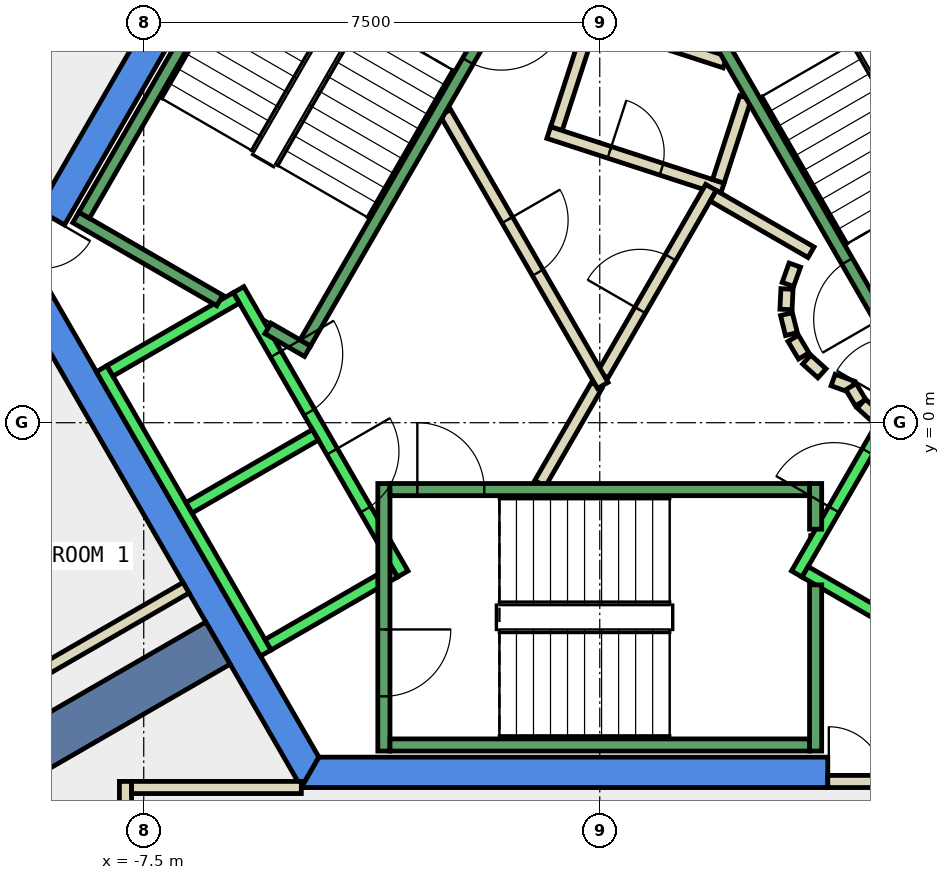
"""IFC4 building model, lengths in metres.
Left out: names, types, materials, properties, quantities, classifications, styles, units other than length and angle.
Written with IfcOpenShell. Run it as: python <this file> out.ifc"""

import sys

from ifc_helpers import new_model, si_unit, direction, frame, frame_2d, origin, place, context, subcontext, project, spatial, polyline, rectangle, outline, extrude, element, fill, save


model = new_model("IFC4")
c1 = context("Model", 3, precision=1e-05, world=origin(), true_north=direction((0.0, 1.0)))
c2 = subcontext(c1, "Body", "Model", "MODEL_VIEW")
j1 = project(units=[si_unit("LENGTHUNIT", "METRE"), si_unit("PLANEANGLEUNIT", "RADIAN")], contexts=[c1])
p1 = place(None, origin())
s1 = spatial("IfcSite", under=j1, at=p1, CompositionType="ELEMENT")
p2 = place(p1, origin())
s2 = spatial("IfcBuilding", under=s1, at=p2, CompositionType="ELEMENT")
p3 = place(p2, frame((0.0, 0.0, 300.8)))
s3 = spatial("IfcBuildingStorey", under=s2, at=p3, CompositionType="ELEMENT", Elevation=300.8)
p4 = place(p3, frame((0.0, 0.0, -0.34)))
e1 = element("IfcWall", 1, at=p4, inside=s3, PredefinedType="SHEAR", context=c2, shape_type="SweptSolid", body=[
    extrude(outline(polyline([(-9.236, 3.502), (-8.803, 3.253), (-4.619, 10.5), (-4.907, 11.0), (-9.236, 3.502)])), origin(), (0.0, 0.0, 1.0), 3.6),
])
p5 = place(p3, frame((0.0, 0.0, -0.34)))
e2 = element("IfcWall", 2, at=p5, inside=s3, PredefinedType="SHEAR", context=c2, shape_type="SweptSolid", body=[
    extrude(outline(polyline([(-9.815, 2.5), (-4.907, -6.0), (-4.619, -5.5), (-9.238, 2.5), (-9.815, 2.5)])), origin(), (0.0, 0.0, 1.0), 3.6),
])
p6 = place(p3, frame((0.0, 0.0, -0.34)))
e3 = element("IfcWall", 3, at=p6, inside=s3, PredefinedType="SHEAR", context=c2, shape_type="SweptSolid", body=[
    extrude(outline(polyline([(3.75, -6.0), (3.75, -5.5), (-4.619, -5.5), (-4.907, -6.0), (3.75, -6.0)])), origin(), (0.0, 0.0, 1.0), 3.6),
])
p7 = place(p3, frame((-6.279, -3.625, -0.34), z_axis=(0.0, 0.0, 1.0), x_axis=(-0.866017533419, -0.500013631625, 0.0)))
e4 = element("IfcWall", 4, at=p7, inside=s3, PredefinedType="SHEAR", context=c2, shape_type="SweptSolid", body=[
    extrude(rectangle(XDim=9.0, YDim=0.8, at=frame_2d((4.5, 0.0))), origin(), (0.0, 0.0, 1.0), 3.6),
])
p8 = place(p3, frame((2.06, 5.931, 0.0), z_axis=(0.0, 0.0, 1.0), x_axis=(-0.95092855133, 0.309410552932, 0.0)))
e5 = element("IfcWall", 5, at=p8, inside=s3, PredefinedType="PARTITIONING", context=c2, shape_type="SweptSolid", body=[
    extrude(rectangle(XDim=2.399, YDim=0.2, at=frame_2d((1.199, 0.0))), origin(), (0.0, 0.0, 1.0), 3.26),
])
p9 = place(p3, frame((-0.157, 6.547, 0.0), z_axis=(0.0, 0.0, 1.0), x_axis=(-0.308813127339, -0.951122732555, 0.0)))
e6 = element("IfcWall", 6, at=p9, inside=s3, PredefinedType="PARTITIONING", context=c2, shape_type="SweptSolid", body=[
    extrude(rectangle(XDim=1.8, YDim=0.2, at=frame_2d((0.9, 0.0))), origin(), (0.0, 0.0, 1.0), 3.26),
])
p10 = place(p3, frame((-0.839, 4.771, 0.0), z_axis=(0.0, 0.0, 1.0), x_axis=(0.950961084355, -0.309310549515, 0.0)))
e7 = element("IfcWall", 7, at=p10, inside=s3, PredefinedType="PARTITIONING", context=c2, shape_type="SweptSolid", body=[
    extrude(rectangle(XDim=3.0, YDim=0.2, at=frame_2d((1.5, 0.0))), origin(), (0.0, 0.0, 1.0), 3.26),
])
p11 = place(p10, frame((1.05, 0.0, 0.0)))
e8 = element("IfcOpeningElement", 8, at=p11, cuts=e7, PredefinedType="OPENING", context=c2, shape_type="SweptSolid", body=[
    extrude(rectangle(XDim=0.9, YDim=2.1, at=frame_2d((0.45, 1.05))), frame((0.0, 0.11, 0.0), z_axis=(0.0, -1.0, 0.0), x_axis=(1.0, 0.0, 0.0)), (0.0, 0.0, 1.0), 0.22),
])
p12 = place(p3, frame((1.95, 3.97, 0.0), z_axis=(0.0, 0.0, 1.0), x_axis=(0.308583003896, 0.951197418892, 0.0)))
e9 = element("IfcWall", 9, at=p12, inside=s3, PredefinedType="PARTITIONING", context=c2, shape_type="SweptSolid", body=[
    extrude(rectangle(XDim=1.449, YDim=0.2, at=frame_2d((0.724, 0.0))), origin(), (0.0, 0.0, 1.0), 3.26),
])
p13 = place(p3, frame((-0.982, -1.0, 0.0), z_axis=(0.0, 0.0, 1.0), x_axis=(0.50024047865, 0.865886518847, 0.0)))
e10 = element("IfcWall", 10, at=p13, inside=s3, PredefinedType="PARTITIONING", context=c2, shape_type="SweptSolid", body=[
    extrude(rectangle(XDim=1.863, YDim=0.2, at=frame_2d((0.931, 0.0))), origin(), (0.0, 0.0, 1.0), 3.26),
])
p14 = place(p3, frame((0.05, 0.787, 0.0), z_axis=(0.0, 0.0, 1.0), x_axis=(0.499954076797, 0.866051915934, 0.0)))
e11 = element("IfcWall", 11, at=p14, inside=s3, PredefinedType="PARTITIONING", context=c2, shape_type="SweptSolid", body=[
    extrude(rectangle(XDim=3.558, YDim=0.2, at=frame_2d((1.779, 0.0))), origin(), (0.0, 0.0, 1.0), 3.26),
])
p15 = place(p14, frame((1.229, 0.0, 0.0)))
e12 = element("IfcOpeningElement", 12, at=p15, cuts=e11, PredefinedType="OPENING", context=c2, shape_type="SweptSolid", body=[
    extrude(rectangle(XDim=1.0, YDim=2.1, at=frame_2d((0.5, 1.05))), frame((0.0, 0.11, 0.0), z_axis=(0.0, -1.0, 0.0), x_axis=(1.0, 0.0, 0.0)), (0.0, 0.0, 1.0), 0.22),
])
p16 = place(p3, frame((1.866, 3.732, 0.0), z_axis=(0.0, 0.0, 1.0), x_axis=(0.866043361281, -0.499968895414, 0.0)))
e13 = element("IfcWall", 13, at=p16, inside=s3, PredefinedType="PARTITIONING", context=c2, shape_type="SweptSolid", body=[
    extrude(rectangle(XDim=1.858, YDim=0.2, at=frame_2d((0.929, 0.0))), origin(), (0.0, 0.0, 1.0), 3.26),
])
p17 = place(p3, frame((3.208, 2.592, 0.0), z_axis=(0.0, 0.0, 1.0), x_axis=(-0.337388820924, -0.941365382578, 0.0)))
e14 = element("IfcWall", 14, at=p17, inside=s3, PredefinedType="PARTITIONING", context=c2, shape_type="SweptSolid", body=[
    extrude(rectangle(XDim=0.338, YDim=0.2, at=frame_2d((0.169, 0.0))), origin(), (0.0, 0.0, 1.0), 3.26),
])
p18 = place(p3, frame((3.079, 2.199, 0.0), z_axis=(0.0, 0.0, 1.0), x_axis=(-0.047771483479, -0.998858290933, 0.0)))
e15 = element("IfcWall", 15, at=p18, inside=s3, PredefinedType="PARTITIONING", context=c2, shape_type="SweptSolid", body=[
    extrude(rectangle(XDim=0.337, YDim=0.2, at=frame_2d((0.169, 0.0))), origin(), (0.0, 0.0, 1.0), 3.26),
])
p19 = place(p3, frame((3.07, 1.786, 0.0), z_axis=(0.0, 0.0, 1.0), x_axis=(0.242705583207, -0.970099994784, 0.0)))
e16 = element("IfcWall", 16, at=p19, inside=s3, PredefinedType="PARTITIONING", context=c2, shape_type="SweptSolid", body=[
    extrude(rectangle(XDim=0.338, YDim=0.2, at=frame_2d((0.169, 0.0))), origin(), (0.0, 0.0, 1.0), 3.26),
])
for number, where, z_axis, x_axis in (
    (17, (3.182, 1.388, 0.0), (0.0, 0.0, 1.0), (0.512, -0.859, 0.0)),
    (18, (3.404, 1.039, 0.0), (0.0, 0.0, 1.0), (0.74, -0.672, 0.0)),
):
    element("IfcWall", number, at=place(p3, frame(where, z_axis=z_axis, x_axis=x_axis)), inside=s3, PredefinedType="PARTITIONING", context=c2, shape_type="SweptSolid", body=[
        extrude(rectangle(XDim=0.338, YDim=0.2, at=frame_2d((0.169, 0.0))), origin(), (0.0, 0.0, 1.0), 3.26),
    ])
p20 = place(p3, frame((3.838, 0.702, 0.0), z_axis=(0.0, 0.0, 1.0), x_axis=(0.941035081519, -0.338308993895, 0.0)))
e19 = element("IfcWall", 19, at=p20, inside=s3, PredefinedType="PARTITIONING", context=c2, shape_type="SweptSolid", body=[
    extrude(rectangle(XDim=0.337, YDim=0.2, at=frame_2d((0.168, 0.0))), origin(), (0.0, 0.0, 1.0), 3.26),
])
p21 = place(p3, frame((4.132, 0.593, 0.0), z_axis=(0.0, 0.0, 1.0), x_axis=(0.513561617048, -0.858052717201, 0.0)))
e20 = element("IfcWall", 20, at=p21, inside=s3, PredefinedType="PARTITIONING", context=c2, shape_type="SweptSolid", body=[
    extrude(rectangle(XDim=0.308, YDim=0.2, at=frame_2d((0.154, 0.0))), origin(), (0.0, 0.0, 1.0), 3.26),
])
p22 = place(p3, frame((4.301, 0.315, 0.0), z_axis=(0.0, 0.0, 1.0), x_axis=(0.741798017506, -0.670623367639, 0.0)))
e21 = element("IfcWall", 21, at=p22, inside=s3, PredefinedType="PARTITIONING", context=c2, shape_type="SweptSolid", body=[
    extrude(rectangle(XDim=0.309, YDim=0.2, at=frame_2d((0.154, 0.0))), origin(), (0.0, 0.0, 1.0), 3.26),
])
p23 = place(p3, frame((-2.54, 5.1, 0.0), z_axis=(0.0, 0.0, 1.0), x_axis=(0.499925051871, -0.866068670783, 0.0)))
e22 = element("IfcWall", 22, at=p23, inside=s3, PredefinedType="PARTITIONING", context=c2, shape_type="SweptSolid", body=[
    extrude(rectangle(XDim=5.181, YDim=0.2, at=frame_2d((2.59, 0.0))), origin(), (0.0, 0.0, 1.0), 3.26),
])
p24 = place(p23, frame((2.04, 0.0, 0.0)))
e23 = element("IfcOpeningElement", 23, at=p24, cuts=e22, PredefinedType="OPENING", context=c2, shape_type="SweptSolid", body=[
    extrude(rectangle(XDim=1.0, YDim=2.1, at=frame_2d((0.5, 1.05))), frame((0.0, 0.11, 0.0), z_axis=(0.0, -1.0, 0.0), x_axis=(1.0, 0.0, 0.0)), (0.0, 0.0, 1.0), 0.22),
])
p25 = place(p3, frame((-7.8, -10.559, 0.0), z_axis=(0.0, 0.0, 1.0), x_axis=(0.0, 1.0, 0.0)))
e24 = element("IfcWall", 24, at=p25, inside=s3, PredefinedType="PARTITIONING", context=c2, shape_type="SweptSolid", body=[
    extrude(rectangle(XDim=4.66, YDim=0.2, at=frame_2d((2.33, 0.0))), origin(), (0.0, 0.0, 1.0), 3.26),
])
p26 = place(p25, frame((1.83, 0.0, 0.0)))
e25 = element("IfcOpeningElement", 25, at=p26, cuts=e24, PredefinedType="OPENING", context=c2, shape_type="SweptSolid", body=[
    extrude(rectangle(XDim=1.0, YDim=2.1, at=frame_2d((0.5, 1.05))), frame((0.0, 0.11, 0.0), z_axis=(0.0, -1.0, 0.0), x_axis=(1.0, 0.0, 0.0)), (0.0, 0.0, 1.0), 0.22),
])
p27 = place(p3, frame((-7.7, -5.999, 0.0), z_axis=(0.0, 0.0, 1.0), x_axis=(1.0, 0.0, 0.0)))
e26 = element("IfcWall", 26, at=p27, inside=s3, PredefinedType="PARTITIONING", context=c2, shape_type="SweptSolid", body=[
    extrude(rectangle(XDim=2.792, YDim=0.2, at=frame_2d((1.396, 0.0))), origin(), (0.0, 0.0, 1.0), 3.26),
])
p28 = place(p3, frame((-6.804, -2.714, 0.0), z_axis=(0.0, 0.0, 1.0), x_axis=(-0.866057565063, -0.499944290893, 0.0)))
e27 = element("IfcWall", 27, at=p28, inside=s3, PredefinedType="PARTITIONING", context=c2, shape_type="SweptSolid", body=[
    extrude(rectangle(XDim=6.7, YDim=0.2, at=frame_2d((3.35, 0.0))), origin(), (0.0, 0.0, 1.0), 3.26),
])
p29 = place(p3, frame((3.75, -5.9, 0.0), z_axis=(0.0, 0.0, 1.0), x_axis=(1.0, 0.0, 0.0)))
e28 = element("IfcWall", 28, at=p29, inside=s3, PredefinedType="PARTITIONING", context=c2, shape_type="SweptSolid", body=[
    extrude(rectangle(XDim=0.926, YDim=0.2, at=frame_2d((0.463, 0.0))), origin(), (0.0, 0.0, 1.0), 2.4),
])
p30 = place(p29, frame((0.017, 0.0, 0.0)))
e29 = element("IfcOpeningElement", 29, at=p30, cuts=e28, PredefinedType="OPENING", context=c2, shape_type="SweptSolid", body=[
    extrude(rectangle(XDim=0.9, YDim=2.1, at=frame_2d((0.45, 1.05))), frame((0.0, 0.11, 0.0), z_axis=(0.0, -1.0, 0.0), x_axis=(1.0, 0.0, 0.0)), (0.0, 0.0, 1.0), 0.22),
])
p31 = place(p3, frame((-5.94, 2.188, 0.0), z_axis=(0.0, 0.0, 1.0), x_axis=(0.500034260056, -0.866005622828, 0.0)))
e30 = element("IfcWall", 30, at=p31, inside=s3, PredefinedType="STANDARD", context=c2, shape_type="SweptSolid", body=[
    extrude(rectangle(XDim=5.399, YDim=0.2, at=frame_2d((2.7, 0.0))), origin(), (0.0, 0.0, 1.0), 3.26),
])
p32 = place(p31, frame((3.075, 0.0, 0.0)))
e31 = element("IfcOpeningElement", 31, at=p32, cuts=e30, PredefinedType="OPENING", context=c2, shape_type="SweptSolid", body=[
    extrude(rectangle(XDim=1.1, YDim=2.1, at=frame_2d((0.55, 1.05))), frame((0.0, 0.11, 0.0), z_axis=(0.0, -1.0, 0.0), x_axis=(1.0, 0.0, 0.0)), (0.0, 0.0, 1.0), 0.22),
])
p33 = place(p31, frame((1.225, 0.0, 0.0)))
e32 = element("IfcOpeningElement", 32, at=p33, cuts=e30, PredefinedType="OPENING", context=c2, shape_type="SweptSolid", body=[
    extrude(rectangle(XDim=1.1, YDim=2.1, at=frame_2d((0.55, 1.05))), frame((0.0, 0.11, 0.0), z_axis=(0.0, -1.0, 0.0), x_axis=(1.0, 0.0, 0.0)), (0.0, 0.0, 1.0), 0.22),
])
p34 = place(p3, frame((-8.192, 0.888, 0.0), z_axis=(0.0, 0.0, 1.0), x_axis=(0.500034260056, -0.866005622828, 0.0)))
e33 = element("IfcWall", 33, at=p34, inside=s3, PredefinedType="STANDARD", context=c2, shape_type="SweptSolid", body=[
    extrude(rectangle(XDim=5.399, YDim=0.2, at=frame_2d((2.7, 0.0))), origin(), (0.0, 0.0, 1.0), 3.26),
])
for number, where, z_axis, x_axis in (
    (34, (-5.977, 2.052, 0.0), (0.0, 0.0, 1.0), (-0.866, -0.5, 0.0)),
    (35, (-4.677, -0.2, 0.0), (0.0, 0.0, 1.0), (-0.866, -0.5, 0.0)),
):
    element("IfcWall", number, at=place(p3, frame(where, z_axis=z_axis, x_axis=x_axis)), inside=s3, PredefinedType="STANDARD", context=c2, shape_type="SweptSolid", body=[
        extrude(rectangle(XDim=2.399, YDim=0.2, at=frame_2d((1.2, 0.0))), origin(), (0.0, 0.0, 1.0), 3.26),
    ])
p35 = place(p3, frame((-3.377, -2.452, 0.0), z_axis=(0.0, 0.0, 1.0), x_axis=(-0.865955154139, -0.50012165622, 0.0)))
e36 = element("IfcWall", 36, at=p35, inside=s3, PredefinedType="STANDARD", context=c2, shape_type="SweptSolid", body=[
    extrude(rectangle(XDim=2.4, YDim=0.2, at=frame_2d((1.2, 0.0))), origin(), (0.0, 0.0, 1.0), 3.26),
])
p36 = place(p3, frame((3.24, -2.488, 0.0), z_axis=(0.0, 0.0, 1.0), x_axis=(0.500034260056, 0.866005622828, 0.0)))
e37 = element("IfcWall", 37, at=p36, inside=s3, PredefinedType="STANDARD", context=c2, shape_type="SweptSolid", body=[
    extrude(rectangle(XDim=5.399, YDim=0.2, at=frame_2d((2.7, 0.0))), origin(), (0.0, 0.0, 1.0), 3.26),
])
p37 = place(p36, frame((3.225, 0.0, 0.0)))
e38 = element("IfcOpeningElement", 38, at=p37, cuts=e37, PredefinedType="OPENING", context=c2, shape_type="SweptSolid", body=[
    extrude(rectangle(XDim=1.1, YDim=2.1, at=frame_2d((0.55, 1.05))), frame((0.0, 0.11, 0.0), z_axis=(0.0, -1.0, 0.0), x_axis=(1.0, 0.0, 0.0)), (0.0, 0.0, 1.0), 0.22),
])
p38 = place(p36, frame((1.225, 0.0, 0.0)))
e39 = element("IfcOpeningElement", 39, at=p38, cuts=e37, PredefinedType="OPENING", context=c2, shape_type="SweptSolid", body=[
    extrude(rectangle(XDim=1.1, YDim=2.1, at=frame_2d((0.55, 1.05))), frame((0.0, 0.11, 0.0), z_axis=(0.0, -1.0, 0.0), x_axis=(1.0, 0.0, 0.0)), (0.0, 0.0, 1.0), 0.22),
])
p39 = place(p3, frame((3.377, -2.452, 0.0), z_axis=(0.0, 0.0, 1.0), x_axis=(0.865955154139, -0.50012165622, 0.0)))
e40 = element("IfcWall", 40, at=p39, inside=s3, PredefinedType="STANDARD", context=c2, shape_type="SweptSolid", body=[
    extrude(rectangle(XDim=2.4, YDim=0.2, at=frame_2d((1.2, 0.0))), origin(), (0.0, 0.0, 1.0), 3.26),
])
p40 = place(p3, frame((-3.55, -1.0, 0.0), z_axis=(0.0, 0.0, 1.0), x_axis=(0.0, -1.0, 0.0)))
e41 = element("IfcWall", 41, at=p40, inside=s3, PredefinedType="STANDARD", context=c2, shape_type="SweptSolid", body=[
    extrude(rectangle(XDim=4.4, YDim=0.2, at=frame_2d((2.2, 0.0))), origin(), (0.0, 0.0, 1.0), 3.26),
])
p41 = place(p40, frame((2.4, 0.0, 0.0)))
e42 = element("IfcOpeningElement", 42, at=p41, cuts=e41, PredefinedType="OPENING", context=c2, shape_type="SweptSolid", body=[
    extrude(rectangle(XDim=1.1, YDim=2.2, at=frame_2d((0.55, 1.1))), frame((0.0, 0.11, 0.0), z_axis=(0.0, -1.0, 0.0), x_axis=(1.0, 0.0, 0.0)), (0.0, 0.0, 1.0), 0.22),
])
p42 = place(p3, frame((3.55, -2.667, 0.0), z_axis=(0.0, 0.0, 1.0), x_axis=(0.0, -1.0, 0.0)))
e43 = element("IfcWall", 43, at=p42, inside=s3, PredefinedType="STANDARD", context=c2, shape_type="SweptSolid", body=[
    extrude(rectangle(XDim=2.733, YDim=0.2, at=frame_2d((1.366, 0.0))), origin(), (0.0, 0.0, 1.0), 3.26),
])
p43 = place(p3, frame((3.55, -1.0, 0.0), z_axis=(0.0, 0.0, 1.0), x_axis=(0.0, -1.0, 0.0)))
e44 = element("IfcWall", 44, at=p43, inside=s3, PredefinedType="STANDARD", context=c2, shape_type="SweptSolid", body=[
    extrude(rectangle(XDim=0.751, YDim=0.2, at=frame_2d((0.375, 0.0))), origin(), (0.0, 0.0, 1.0), 3.26),
])
p44 = place(p3, frame((-3.45, -1.1, 0.0), z_axis=(0.0, 0.0, 1.0), x_axis=(1.0, 0.0, 0.0)))
e45 = element("IfcWall", 45, at=p44, inside=s3, PredefinedType="STANDARD", context=c2, shape_type="SweptSolid", body=[
    extrude(rectangle(XDim=6.9, YDim=0.2, at=frame_2d((3.45, 0.0))), origin(), (0.0, 0.0, 1.0), 3.26),
])
p45 = place(p44, frame((0.45, 0.0, 0.0)))
e46 = element("IfcOpeningElement", 46, at=p45, cuts=e45, PredefinedType="OPENING", context=c2, shape_type="SweptSolid", body=[
    extrude(rectangle(XDim=1.1, YDim=2.2, at=frame_2d((0.55, 1.1))), frame((0.0, 0.11, 0.0), z_axis=(0.0, -1.0, 0.0), x_axis=(1.0, 0.0, 0.0)), (0.0, 0.0, 1.0), 0.22),
])
p46 = place(p3, frame((-3.45, -5.3, 0.0), z_axis=(0.0, 0.0, 1.0), x_axis=(1.0, 0.0, 0.0)))
e47 = element("IfcWall", 47, at=p46, inside=s3, PredefinedType="STANDARD", context=c2, shape_type="SweptSolid", body=[
    extrude(rectangle(XDim=6.9, YDim=0.2, at=frame_2d((3.45, 0.0))), origin(), (0.0, 0.0, 1.0), 3.26),
])
p47 = place(p3, frame((4.843, 1.312, 0.0), z_axis=(0.0, 0.0, 1.0), x_axis=(-0.499963383562, 0.866046543262, 0.0)))
e48 = element("IfcWall", 48, at=p47, inside=s3, PredefinedType="STANDARD", context=c2, shape_type="SweptSolid", body=[
    extrude(rectangle(XDim=6.9, YDim=0.2, at=frame_2d((3.45, 0.0))), origin(), (0.0, 0.0, 1.0), 3.26),
])
p48 = place(p47, frame((0.45, 0.0, 0.0)))
e49 = element("IfcOpeningElement", 49, at=p48, cuts=e48, PredefinedType="OPENING", context=c2, shape_type="SweptSolid", body=[
    extrude(rectangle(XDim=1.1, YDim=2.2, at=frame_2d((0.55, 1.1))), frame((0.0, 0.11, 0.0), z_axis=(0.0, -1.0, 0.0), x_axis=(1.0, 0.0, 0.0)), (0.0, 0.0, 1.0), 0.22),
])
p49 = place(p3, frame((-6.25, 2.01, 0.0), z_axis=(0.0, 0.0, 1.0), x_axis=(-0.86611865017, 0.499838457731, 0.0)))
e50 = element("IfcWall", 50, at=p49, inside=s3, PredefinedType="STANDARD", context=c2, shape_type="SweptSolid", body=[
    extrude(rectangle(XDim=2.733, YDim=0.2, at=frame_2d((1.366, 0.0))), origin(), (0.0, 0.0, 1.0), 3.26),
])
p50 = place(p3, frame((-4.806, 1.176, 0.0), z_axis=(0.0, 0.0, 1.0), x_axis=(-0.866558586415, 0.499075361355, 0.0)))
e51 = element("IfcWall", 51, at=p50, inside=s3, PredefinedType="STANDARD", context=c2, shape_type="SweptSolid", body=[
    extrude(rectangle(XDim=0.751, YDim=0.2, at=frame_2d((0.376, 0.0))), origin(), (0.0, 0.0, 1.0), 3.26),
])
p51 = place(p3, frame((-1.393, 7.288, 0.0), z_axis=(0.0, 0.0, 1.0), x_axis=(-0.499963383562, -0.866046543262, 0.0)))
e52 = element("IfcWall", 52, at=p51, inside=s3, PredefinedType="STANDARD", context=c2, shape_type="SweptSolid", body=[
    extrude(rectangle(XDim=6.9, YDim=0.2, at=frame_2d((3.45, 0.0))), origin(), (0.0, 0.0, 1.0), 3.26),
])
p52 = place(p51, frame((0.45, 0.0, 0.0)))
e53 = element("IfcOpeningElement", 53, at=p52, cuts=e52, PredefinedType="OPENING", context=c2, shape_type="SweptSolid", body=[
    extrude(rectangle(XDim=1.1, YDim=2.2, at=frame_2d((0.55, 1.1))), frame((0.0, 0.11, 0.0), z_axis=(0.0, -1.0, 0.0), x_axis=(1.0, 0.0, 0.0)), (0.0, 0.0, 1.0), 0.22),
])
p53 = place(p3, frame((-5.03, 9.388, 0.0), z_axis=(0.0, 0.0, 1.0), x_axis=(-0.499978703459, -0.866037698999, 0.0)))
e54 = element("IfcWall", 54, at=p53, inside=s3, PredefinedType="STANDARD", context=c2, shape_type="SweptSolid", body=[
    extrude(rectangle(XDim=6.9, YDim=0.2, at=frame_2d((3.45, 0.0))), origin(), (0.0, 0.0, 1.0), 3.26),
])
p54 = place(p15, origin())
e55 = element("IfcDoor", 55, at=p54, inside=s3, OperationType="SINGLE_SWING_RIGHT", PredefinedType="DOOR", context=c2, shape_type="SweptSolid", body=[
    extrude(rectangle(XDim=1.0, YDim=2.1, at=frame_2d((0.5, 1.05))), frame((0.0, 0.025, 0.0), z_axis=(0.0, -1.0, 0.0), x_axis=(1.0, 0.0, 0.0)), (0.0, 0.0, 1.0), 0.05),
])
fill(e12, e55)
p55 = place(p24, origin())
e56 = element("IfcDoor", 56, at=p55, inside=s3, OperationType="SINGLE_SWING_RIGHT", PredefinedType="DOOR", context=c2, shape_type="SweptSolid", body=[
    extrude(rectangle(XDim=1.0, YDim=2.1, at=frame_2d((0.5, 1.05))), frame((0.0, 0.025, 0.0), z_axis=(0.0, -1.0, 0.0), x_axis=(1.0, 0.0, 0.0)), (0.0, 0.0, 1.0), 0.05),
])
fill(e23, e56)
p56 = place(p11, origin())
e57 = element("IfcDoor", 57, at=p56, inside=s3, OperationType="SINGLE_SWING_LEFT", PredefinedType="DOOR", context=c2, shape_type="SweptSolid", body=[
    extrude(rectangle(XDim=0.9, YDim=2.1, at=frame_2d((0.45, 1.05))), frame((0.0, 0.025, 0.0), z_axis=(0.0, -1.0, 0.0), x_axis=(1.0, 0.0, 0.0)), (0.0, 0.0, 1.0), 0.05),
])
fill(e8, e57)
p57 = place(p30, origin())
e58 = element("IfcDoor", 58, at=p57, inside=s3, OperationType="SINGLE_SWING_LEFT", PredefinedType="DOOR", context=c2, shape_type="SweptSolid", body=[
    extrude(rectangle(XDim=0.9, YDim=2.1, at=frame_2d((0.45, 1.05))), frame((0.0, 0.025, 0.0), z_axis=(0.0, -1.0, 0.0), x_axis=(1.0, 0.0, 0.0)), (0.0, 0.0, 1.0), 0.05),
])
fill(e29, e58)
p58 = place(p32, origin())
e59 = element("IfcDoor", 59, at=p58, inside=s3, OperationType="SLIDING_TO_LEFT", PredefinedType="DOOR", context=c2, shape_type="SweptSolid", body=[
    extrude(rectangle(XDim=1.1, YDim=2.1, at=frame_2d((0.55, 1.05))), frame((0.0, 0.025, 0.0), z_axis=(0.0, -1.0, 0.0), x_axis=(1.0, 0.0, 0.0)), (0.0, 0.0, 1.0), 0.05),
])
fill(e31, e59)
p59 = place(p38, origin())
e60 = element("IfcDoor", 60, at=p59, inside=s3, OperationType="SLIDING_TO_LEFT", PredefinedType="DOOR", context=c2, shape_type="SweptSolid", body=[
    extrude(rectangle(XDim=1.1, YDim=2.1, at=frame_2d((0.55, 1.05))), frame((0.0, 0.025, 0.0), z_axis=(0.0, -1.0, 0.0), x_axis=(1.0, 0.0, 0.0)), (0.0, 0.0, 1.0), 0.05),
])
fill(e39, e60)
p60 = place(p33, origin())
e61 = element("IfcDoor", 61, at=p60, inside=s3, OperationType="SLIDING_TO_LEFT", PredefinedType="DOOR", context=c2, shape_type="SweptSolid", body=[
    extrude(rectangle(XDim=1.1, YDim=2.1, at=frame_2d((0.55, 1.05))), frame((0.0, 0.025, 0.0), z_axis=(0.0, -1.0, 0.0), x_axis=(1.0, 0.0, 0.0)), (0.0, 0.0, 1.0), 0.05),
])
fill(e32, e61)
p61 = place(p45, origin())
e62 = element("IfcDoor", 62, at=p61, inside=s3, OperationType="SINGLE_SWING_LEFT", PredefinedType="DOOR", context=c2, shape_type="SweptSolid", body=[
    extrude(rectangle(XDim=1.1, YDim=2.2, at=frame_2d((0.55, 1.1))), frame((0.0, 0.025, 0.0), z_axis=(0.0, -1.0, 0.0), x_axis=(1.0, 0.0, 0.0)), (0.0, 0.0, 1.0), 0.05),
])
fill(e46, e62)
p62 = place(p41, origin())
e63 = element("IfcDoor", 63, at=p62, inside=s3, OperationType="SINGLE_SWING_LEFT", PredefinedType="DOOR", context=c2, shape_type="SweptSolid", body=[
    extrude(rectangle(XDim=1.1, YDim=2.2, at=frame_2d((0.55, 1.1))), frame((0.0, 0.025, 0.0), z_axis=(0.0, -1.0, 0.0), x_axis=(1.0, 0.0, 0.0)), (0.0, 0.0, 1.0), 0.05),
])
fill(e42, e63)
p63 = place(p48, origin())
e64 = element("IfcDoor", 64, at=p63, inside=s3, OperationType="SINGLE_SWING_LEFT", PredefinedType="DOOR", context=c2, shape_type="SweptSolid", body=[
    extrude(rectangle(XDim=1.1, YDim=2.2, at=frame_2d((0.55, 1.1))), frame((0.0, 0.025, 0.0), z_axis=(0.0, -1.0, 0.0), x_axis=(1.0, 0.0, 0.0)), (0.0, 0.0, 1.0), 0.05),
])
fill(e49, e64)
p64 = place(p52, origin())
e65 = element("IfcDoor", 65, at=p64, inside=s3, OperationType="SINGLE_SWING_LEFT", PredefinedType="DOOR", context=c2, shape_type="SweptSolid", body=[
    extrude(rectangle(XDim=1.1, YDim=2.2, at=frame_2d((0.55, 1.1))), frame((0.0, 0.025, 0.0), z_axis=(0.0, -1.0, 0.0), x_axis=(1.0, 0.0, 0.0)), (0.0, 0.0, 1.0), 0.05),
])
fill(e53, e65)
save(model, sys.argv[1])
